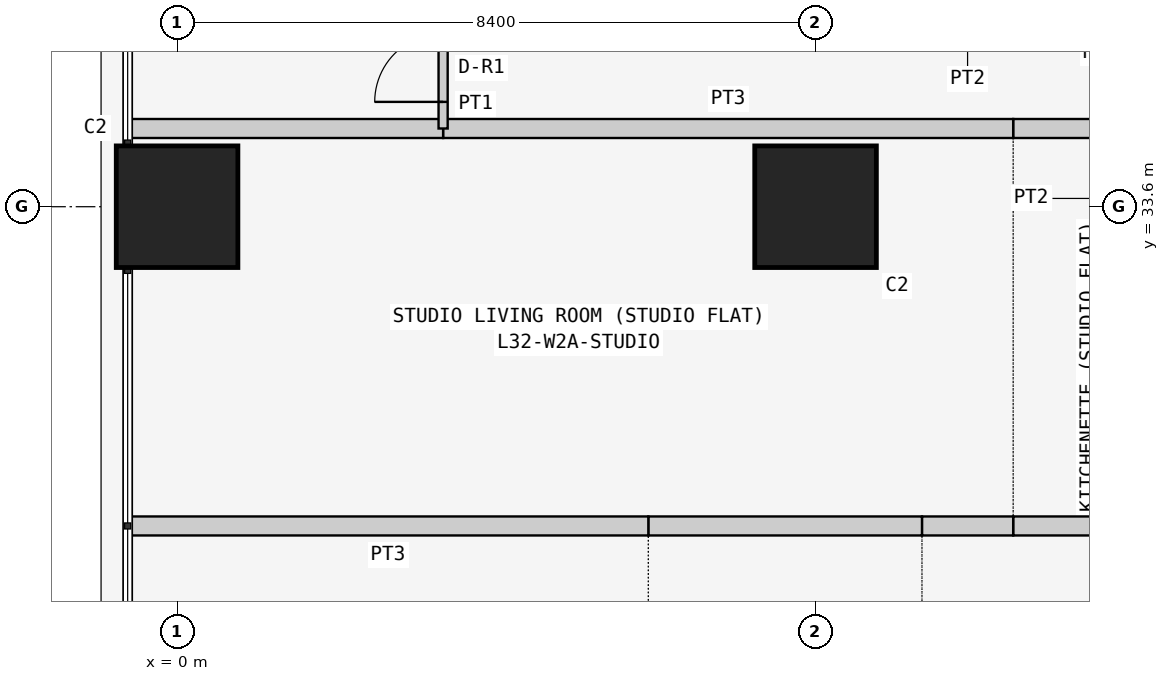
"""IFC4 building model, lengths in metres.
Left out: names, types, materials, properties, quantities, classifications, styles, units other than length and angle.
Written with IfcOpenShell. Run it as: python <this file> out.ifc"""

import sys

from ifc_helpers import new_model, si_unit, direction, frame, frame_2d, origin, origin_2d, place, context, subcontext, project, spatial, rectangle, extrude, element, fill, save


model = new_model("IFC4")
c1 = context("Model", 3, precision=1e-05, world=origin(), true_north=direction((0.0, 1.0)))
c2 = subcontext(c1, "Body", "Model", "MODEL_VIEW")
j1 = project(units=[si_unit("LENGTHUNIT", "METRE"), si_unit("PLANEANGLEUNIT", "RADIAN")], contexts=[c1])
p1 = place(None, origin())
s1 = spatial("IfcSite", under=j1, at=p1, CompositionType="ELEMENT")
p2 = place(p1, origin())
s2 = spatial("IfcBuilding", under=s1, at=p2, CompositionType="ELEMENT")
p3 = place(p2, frame((0.0, 0.0, 126.9)))
s3 = spatial("IfcBuildingStorey", under=s2, at=p3, CompositionType="ELEMENT", Elevation=126.9)
for number, where, z_axis, x_axis in (
    (1, (0.0, 33.6, 0.0), (0.0, 0.0, 1.0), (1.0, 0.0, 0.0)),
    (2, (8.4, 33.6, 0.0), (0.0, 0.0, 1.0), (1.0, 0.0, 0.0)),
):
    element("IfcColumn", number, at=place(p3, frame(where, z_axis=z_axis, x_axis=x_axis)), inside=s3, PredefinedType="COLUMN", context=c2, shape_type="SweptSolid", body=[
        extrude(rectangle(XDim=1.6, YDim=1.6, at=origin_2d()), origin(), (0.0, 0.0, 1.0), 3.6),
    ])
for number, where, z_axis, x_axis in (
    (3, (12.2, 29.4, 0.0), (0.0, 0.0, 1.0), (-1.0, 0.0, 0.0)),
    (4, (11.0, 29.4, 0.0), (0.0, 0.0, 1.0), (-1.0, 0.0, 0.0)),
):
    element("IfcWall", number, at=place(p3, frame(where, z_axis=z_axis, x_axis=x_axis)), inside=s3, PredefinedType="PARTITIONING", context=c2, shape_type="SweptSolid", body=[
        extrude(rectangle(XDim=1.2, YDim=0.25, at=frame_2d((0.6, 0.0))), origin(), (0.0, 0.0, 1.0), 3.45),
    ])
p4 = place(p3, frame((9.8, 29.4, 0.0), z_axis=(0.0, 0.0, 1.0), x_axis=(-1.0, 0.0, 0.0)))
e5 = element("IfcWall", 5, at=p4, inside=s3, PredefinedType="PARTITIONING", context=c2, shape_type="SweptSolid", body=[
    extrude(rectangle(XDim=3.6, YDim=0.25, at=frame_2d((1.8, 0.0))), origin(), (0.0, 0.0, 1.0), 3.45),
])
p5 = place(p3, frame((6.2, 29.4, 0.0), z_axis=(0.0, 0.0, 1.0), x_axis=(-1.0, 0.0, 0.0)))
e6 = element("IfcWall", 6, at=p5, inside=s3, PredefinedType="PARTITIONING", context=c2, shape_type="SweptSolid", body=[
    extrude(rectangle(XDim=6.85, YDim=0.25, at=frame_2d((3.425, 0.0))), origin(), (0.0, 0.0, 1.0), 3.45),
])
p6 = place(p3, frame((11.0, 34.629, 0.0), z_axis=(0.0, 0.0, 1.0), x_axis=(1.0, 0.0, 0.0)))
e7 = element("IfcWall", 7, at=p6, inside=s3, PredefinedType="PARTITIONING", context=c2, shape_type="SweptSolid", body=[
    extrude(rectangle(XDim=2.4, YDim=0.25, at=frame_2d((1.2, 0.0))), origin(), (0.0, 0.0, 1.0), 3.45),
])
p7 = place(p3, frame((3.5, 34.629, 0.0), z_axis=(0.0, 0.0, 1.0), x_axis=(1.0, 0.0, 0.0)))
e8 = element("IfcWall", 8, at=p7, inside=s3, PredefinedType="PARTITIONING", context=c2, shape_type="SweptSolid", body=[
    extrude(rectangle(XDim=7.5, YDim=0.25, at=frame_2d((3.75, 0.0))), origin(), (0.0, 0.0, 1.0), 3.45),
])
p8 = place(p3, frame((-0.65, 34.629, 0.0), z_axis=(0.0, 0.0, 1.0), x_axis=(1.0, 0.0, 0.0)))
e9 = element("IfcWall", 9, at=p8, inside=s3, PredefinedType="PARTITIONING", context=c2, shape_type="SweptSolid", body=[
    extrude(rectangle(XDim=4.15, YDim=0.25, at=frame_2d((2.075, 0.0))), origin(), (0.0, 0.0, 1.0), 3.45),
])
p9 = place(p3, frame((3.5, 34.629, 0.0), z_axis=(0.0, 0.0, 1.0), x_axis=(0.0, 1.0, 0.0)))
e10 = element("IfcWall", 10, at=p9, inside=s3, PredefinedType="PARTITIONING", context=c2, shape_type="SweptSolid", body=[
    extrude(rectangle(XDim=1.6, YDim=0.12, at=frame_2d((0.8, 0.0))), origin(), (0.0, 0.0, 1.0), 3.45),
])
p10 = place(p9, frame((0.35, 0.0, 0.0)))
e11 = element("IfcOpeningElement", 11, at=p10, cuts=e10, PredefinedType="OPENING", context=c2, shape_type="SweptSolid", body=[
    extrude(rectangle(XDim=0.9, YDim=2.1, at=frame_2d((0.45, 1.05))), frame((0.0, 0.07, 0.0), z_axis=(0.0, -1.0, 0.0), x_axis=(1.0, 0.0, 0.0)), (0.0, 0.0, 1.0), 0.14),
])
p11 = place(p10, origin())
e12 = element("IfcDoor", 12, at=p11, inside=s3, OperationType="SINGLE_SWING_LEFT", PredefinedType="DOOR", context=c2, shape_type="SweptSolid", body=[
    extrude(rectangle(XDim=0.9, YDim=2.1, at=frame_2d((0.45, 1.05))), frame((0.0, 0.025, 0.0), z_axis=(0.0, -1.0, 0.0), x_axis=(1.0, 0.0, 0.0)), (0.0, 0.0, 1.0), 0.05),
])
fill(e11, e12)
save(model, sys.argv[1])
